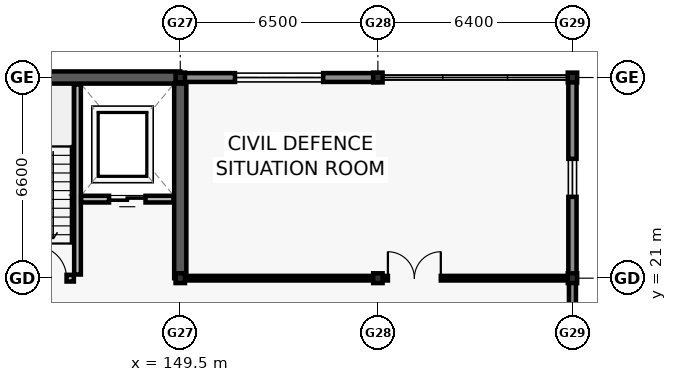
"""IFC4 building model, lengths in metres.
Left out: names, types, materials, properties, quantities, classifications, styles, units other than length and angle.
Written with IfcOpenShell. Run it as: python <this file> out.ifc"""

import sys

from ifc_helpers import new_model, si_unit, direction, frame, frame_2d, origin, origin_2d, place, context, subcontext, project, spatial, rectangle, i_section, extrude, element, fill, save


model = new_model("IFC4")
c1 = context("Model", 3, precision=1e-05, world=origin(), true_north=direction((0.0, 1.0)))
c2 = subcontext(c1, "Body", "Model", "MODEL_VIEW")
j1 = project(units=[si_unit("LENGTHUNIT", "METRE"), si_unit("PLANEANGLEUNIT", "RADIAN")], contexts=[c1])
p1 = place(None, origin())
s1 = spatial("IfcSite", under=j1, at=p1, CompositionType="ELEMENT")
p2 = place(p1, origin())
s2 = spatial("IfcBuilding", under=s1, at=p2, CompositionType="ELEMENT")
p3 = place(p2, frame((0.0, 0.0, 9.6)))
s3 = spatial("IfcBuildingStorey", under=s2, at=p3, CompositionType="ELEMENT", Elevation=9.6)
for number, where, z_axis, x_axis in (
    (1, (149.5, 21.0, 0.0), (0.0, 0.0, 1.0), (1.0, 0.0, 0.0)),
    (2, (149.5, 27.6, 0.0), (0.0, 0.0, 1.0), (1.0, 0.0, 0.0)),
    (3, (156.0, 21.0, 0.0), (0.0, 0.0, 1.0), (1.0, 0.0, 0.0)),
    (4, (156.0, 27.6, 0.0), (0.0, 0.0, 1.0), (1.0, 0.0, 0.0)),
    (5, (162.4, 21.0, 0.0), (0.0, 0.0, 1.0), (1.0, 0.0, 0.0)),
    (6, (162.4, 27.6, 0.0), (0.0, 0.0, 1.0), (1.0, 0.0, 0.0)),
):
    element("IfcColumn", number, at=place(p3, frame(where, z_axis=z_axis, x_axis=x_axis)), inside=s3, PredefinedType="COLUMN", context=c2, shape_type="SweptSolid", body=[
        extrude(i_section(OverallWidth=0.309, OverallDepth=0.321, WebThickness=0.014, FlangeThickness=0.022, FilletRadius=0.017, at=origin_2d()), origin(), (0.0, 0.0, 1.0), 3.9),
    ])
p4 = place(p3, frame((143.0, 27.6, 0.0), z_axis=(0.0, 0.0, 1.0), x_axis=(1.0, 0.0, 0.0)))
e7 = element("IfcWall", 7, at=p4, inside=s3, PredefinedType="SHEAR", context=c2, shape_type="SweptSolid", body=[
    extrude(rectangle(XDim=6.5, YDim=0.4, at=frame_2d((3.25, 0.0))), origin(), (0.0, 0.0, 1.0), 3.66),
])
p5 = place(p3, frame((149.5, 21.0, 0.0), z_axis=(0.0, 0.0, 1.0), x_axis=(0.0, 1.0, 0.0)))
e8 = element("IfcWall", 8, at=p5, inside=s3, PredefinedType="SHEAR", context=c2, shape_type="SweptSolid", body=[
    extrude(rectangle(XDim=6.4, YDim=0.4, at=frame_2d((3.2, 0.0))), origin(), (0.0, 0.0, 1.0), 3.66),
])
p6 = place(p3, frame((149.505, 27.6, 0.0), z_axis=(0.0, 0.0, 1.0), x_axis=(1.0, 0.0, 0.0)))
e9 = element("IfcWall", 9, at=p6, inside=s3, PredefinedType="SOLIDWALL", context=c2, shape_type="SweptSolid", body=[
    extrude(rectangle(XDim=6.49, YDim=0.29, at=frame_2d((3.245, 0.0))), origin(), (0.0, 0.0, 1.0), 3.02),
])
p7 = place(p6, frame((1.795, 0.0, 0.8)))
e10 = element("IfcOpeningElement", 10, at=p7, cuts=e9, PredefinedType="OPENING", context=c2, shape_type="SweptSolid", body=[
    extrude(rectangle(XDim=2.9, YDim=1.15, at=frame_2d((1.45, 0.575))), frame((0.0, 0.155, 0.0), z_axis=(0.0, -1.0, 0.0), x_axis=(1.0, 0.0, 0.0)), (0.0, 0.0, 1.0), 0.31),
])
p8 = place(p3, frame((162.4, 20.995, 0.0), z_axis=(0.0, 0.0, 1.0), x_axis=(0.0, -1.0, 0.0)))
e11 = element("IfcWall", 11, at=p8, inside=s3, PredefinedType="SOLIDWALL", context=c2, shape_type="SweptSolid", body=[
    extrude(rectangle(XDim=6.59, YDim=0.23, at=frame_2d((3.295, 0.0))), origin(), (0.0, 0.0, 1.0), 3.02),
])
p9 = place(p8, frame((3.827, 0.0, 0.8)))
e12 = element("IfcOpeningElement", 12, at=p9, cuts=e11, PredefinedType="OPENING", context=c2, shape_type="SweptSolid", body=[
    extrude(rectangle(XDim=1.7, YDim=1.25, at=frame_2d((0.85, 0.625))), frame((0.0, 0.125, 0.0), z_axis=(0.0, -1.0, 0.0), x_axis=(1.0, 0.0, 0.0)), (0.0, 0.0, 1.0), 0.25),
])
p10 = place(p3, frame((162.4, 27.595, 0.0), z_axis=(0.0, 0.0, 1.0), x_axis=(0.0, -1.0, 0.0)))
e13 = element("IfcWall", 13, at=p10, inside=s3, PredefinedType="SOLIDWALL", context=c2, shape_type="SweptSolid", body=[
    extrude(rectangle(XDim=6.59, YDim=0.27, at=frame_2d((3.295, 0.0))), origin(), (0.0, 0.0, 1.0), 3.02),
])
p11 = place(p10, frame((2.67, 0.0, 0.8)))
e14 = element("IfcOpeningElement", 14, at=p11, cuts=e13, PredefinedType="OPENING", context=c2, shape_type="SweptSolid", body=[
    extrude(rectangle(XDim=1.25, YDim=1.5, at=frame_2d((0.625, 0.75))), frame((0.0, 0.145, 0.0), z_axis=(0.0, -1.0, 0.0), x_axis=(1.0, 0.0, 0.0)), (0.0, 0.0, 1.0), 0.29),
])
p12 = place(p3, frame((146.12, 21.12, 0.0), z_axis=(0.0, 0.0, 1.0), x_axis=(0.0, 1.0, 0.0)))
e15 = element("IfcWall", 15, at=p12, inside=s3, PredefinedType="SOLIDWALL", context=c2, shape_type="SweptSolid", body=[
    extrude(rectangle(XDim=6.255, YDim=0.22, at=frame_2d((3.127, 0.0))), origin(), (0.0, 0.0, 1.0), 3.66),
])
p13 = place(p3, frame((143.26, 21.0, 0.0), z_axis=(0.0, 0.0, 1.0), x_axis=(1.0, 0.0, 0.0)))
e16 = element("IfcWall", 16, at=p13, inside=s3, PredefinedType="SOLIDWALL", context=c2, shape_type="SweptSolid", body=[
    extrude(rectangle(XDim=2.74, YDim=0.22, at=frame_2d((1.37, 0.0))), origin(), (0.0, 0.0, 1.0), 3.02),
])
p14 = place(p13, frame((1.44, 0.0, 0.0)))
e17 = element("IfcOpeningElement", 17, at=p14, cuts=e16, PredefinedType="OPENING", context=c2, shape_type="SweptSolid", body=[
    extrude(rectangle(XDim=1.06, YDim=2.1, at=frame_2d((0.53, 1.05))), frame((0.0, 0.12, 0.0), z_axis=(0.0, -1.0, 0.0), x_axis=(1.0, 0.0, 0.0)), (0.0, 0.0, 1.0), 0.24),
])
p15 = place(p3, frame((146.24, 23.6, 0.0), z_axis=(0.0, 0.0, 1.0), x_axis=(1.0, 0.0, 0.0)))
e18 = element("IfcWall", 18, at=p15, inside=s3, PredefinedType="SOLIDWALL", context=c2, shape_type="SweptSolid", body=[
    extrude(rectangle(XDim=3.035, YDim=0.22, at=frame_2d((1.518, 0.0))), origin(), (0.0, 0.0, 1.0), 3.66),
])
p16 = place(p15, frame((0.917, 0.0, 0.0)))
e19 = element("IfcOpeningElement", 19, at=p16, cuts=e18, PredefinedType="OPENING", context=c2, shape_type="SweptSolid", body=[
    extrude(rectangle(XDim=1.2, YDim=2.15, at=frame_2d((0.6, 1.075))), frame((0.0, 0.12, 0.0), z_axis=(0.0, -1.0, 0.0), x_axis=(1.0, 0.0, 0.0)), (0.0, 0.0, 1.0), 0.24),
])
p17 = place(p3, frame((149.72, 21.0, 0.0), z_axis=(0.0, 0.0, 1.0), x_axis=(1.0, 0.0, 0.0)))
e20 = element("IfcWall", 20, at=p17, inside=s3, PredefinedType="PARTITIONING", context=c2, shape_type="SweptSolid", body=[
    extrude(rectangle(XDim=12.46, YDim=0.15, at=frame_2d((6.23, 0.0))), origin(), (0.0, 0.0, 1.0), 3.0),
])
p18 = place(p17, frame((6.61, 0.0, 0.0)))
e21 = element("IfcOpeningElement", 21, at=p18, cuts=e20, PredefinedType="OPENING", context=c2, shape_type="SweptSolid", body=[
    extrude(rectangle(XDim=1.74, YDim=2.2, at=frame_2d((0.87, 1.1))), frame((0.0, 0.085, 0.0), z_axis=(0.0, -1.0, 0.0), x_axis=(1.0, 0.0, 0.0)), (0.0, 0.0, 1.0), 0.17),
])
p19 = place(p7, origin())
e22 = element("IfcWindow", 22, at=p19, inside=s3, PartitioningType="TRIPLE_PANEL_VERTICAL", PredefinedType="WINDOW", context=c2, shape_type="SweptSolid", body=[
    extrude(rectangle(XDim=2.9, YDim=1.15, at=frame_2d((1.45, 0.575))), frame((0.0, 0.03, 0.0), z_axis=(0.0, -1.0, 0.0), x_axis=(1.0, 0.0, 0.0)), (0.0, 0.0, 1.0), 0.06),
])
fill(e10, e22)
p20 = place(p11, origin())
e23 = element("IfcWindow", 23, at=p20, inside=s3, PartitioningType="SINGLE_PANEL", PredefinedType="WINDOW", context=c2, shape_type="SweptSolid", body=[
    extrude(rectangle(XDim=1.25, YDim=1.5, at=frame_2d((0.625, 0.75))), frame((0.0, 0.03, 0.0), z_axis=(0.0, -1.0, 0.0), x_axis=(1.0, 0.0, 0.0)), (0.0, 0.0, 1.0), 0.06),
])
fill(e14, e23)
p21 = place(p14, origin())
e24 = element("IfcDoor", 24, at=p21, inside=s3, OperationType="SINGLE_SWING_LEFT", PredefinedType="DOOR", context=c2, shape_type="SweptSolid", body=[
    extrude(rectangle(XDim=1.06, YDim=2.1, at=frame_2d((0.53, 1.05))), frame((0.0, 0.025, 0.0), z_axis=(0.0, -1.0, 0.0), x_axis=(1.0, 0.0, 0.0)), (0.0, 0.0, 1.0), 0.05),
])
fill(e17, e24)
p22 = place(p16, origin())
e25 = element("IfcDoor", 25, at=p22, inside=s3, OperationType="DOUBLE_DOOR_SLIDING", PredefinedType="DOOR", context=c2, shape_type="SweptSolid", body=[
    extrude(rectangle(XDim=1.2, YDim=2.15, at=frame_2d((0.6, 1.075))), frame((0.0, 0.025, 0.0), z_axis=(0.0, -1.0, 0.0), x_axis=(1.0, 0.0, 0.0)), (0.0, 0.0, 1.0), 0.05),
])
fill(e19, e25)
p23 = place(p18, origin())
e26 = element("IfcDoor", 26, at=p23, inside=s3, OperationType="DOUBLE_DOOR_SINGLE_SWING", PredefinedType="DOOR", context=c2, shape_type="SweptSolid", body=[
    extrude(rectangle(XDim=1.74, YDim=2.2, at=frame_2d((0.87, 1.1))), frame((0.0, 0.025, 0.0), z_axis=(0.0, -1.0, 0.0), x_axis=(1.0, 0.0, 0.0)), (0.0, 0.0, 1.0), 0.05),
])
fill(e21, e26)
save(model, sys.argv[1])
